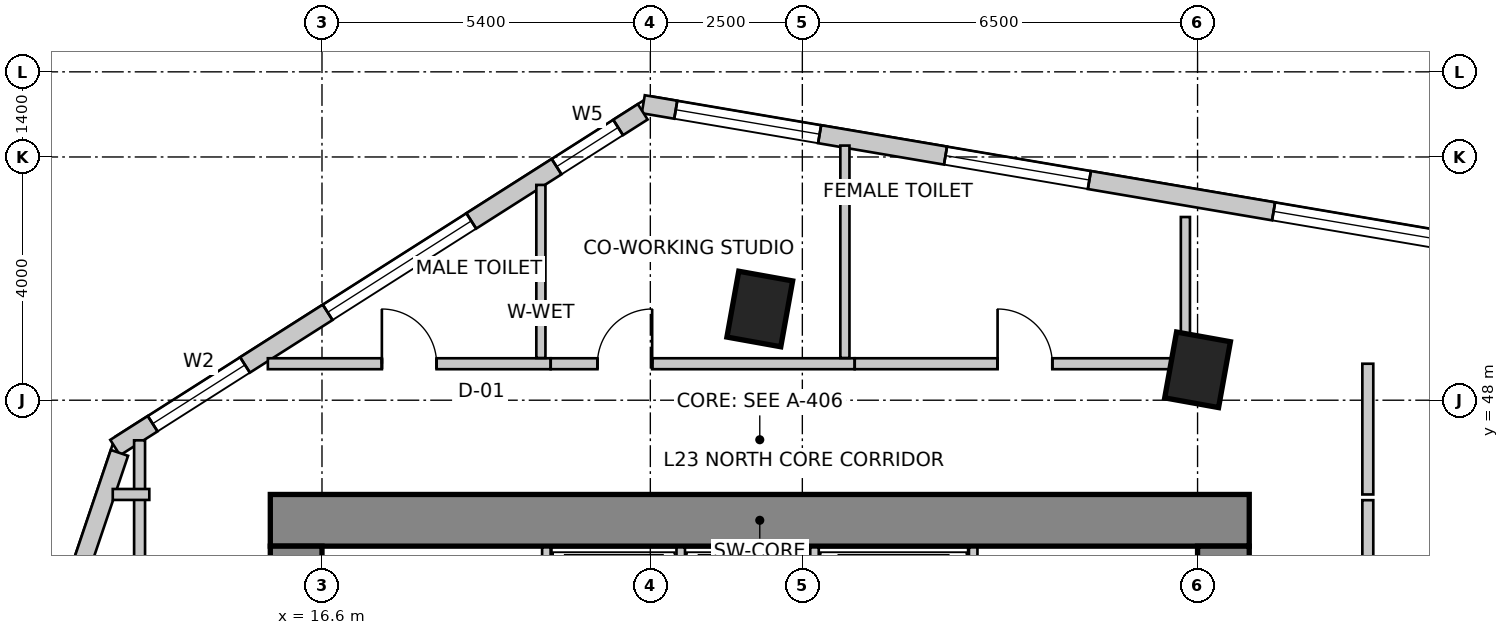
"""IFC4 building model, lengths in metres.
Left out: names, types, materials, properties, quantities, classifications, styles, units other than length and angle.
Written with IfcOpenShell. Run it as: python <this file> out.ifc"""

import sys

from ifc_helpers import new_model, si_unit, direction, frame, frame_2d, origin, origin_2d, place, context, subcontext, project, spatial, rectangle, extrude, source, transform, mapped, element, fill, save


model = new_model("IFC4")
c1 = context("Model", 3, precision=1e-05, world=origin(), true_north=direction((0.0, 1.0)))
c2 = subcontext(c1, "Body", "Model", "MODEL_VIEW")
j1 = project(units=[si_unit("LENGTHUNIT", "METRE"), si_unit("PLANEANGLEUNIT", "RADIAN")], contexts=[c1])
p1 = place(None, origin())
s1 = spatial("IfcSite", under=j1, at=p1, CompositionType="ELEMENT")
p2 = place(p1, origin())
s2 = spatial("IfcBuilding", under=s1, at=p2, CompositionType="ELEMENT")
p3 = place(p2, frame((0.0, 0.0, 95.0)))
s3 = spatial("IfcBuildingStorey", under=s2, at=p3, CompositionType="ELEMENT", Elevation=95.0)
p4 = place(p3, frame((15.75, 46.025, 0.0), z_axis=(0.0, 0.0, 1.0), x_axis=(1.0, 0.0, 0.0)))
e1 = element("IfcWall", 1, at=p4, inside=s3, PredefinedType="SHEAR", context=c2, shape_type="SweptSolid", body=[
    extrude(rectangle(XDim=16.1, YDim=0.85, at=frame_2d((8.05, 0.0))), origin(), (0.0, 0.0, 1.0), 4.0),
])
p5 = place(p3, frame((16.175, 34.2, 0.0), z_axis=(0.0, 0.0, 1.0), x_axis=(0.0, 1.0, 0.0)))
e2 = element("IfcWall", 2, at=p5, inside=s3, PredefinedType="SHEAR", context=c2, shape_type="SweptSolid", body=[
    extrude(rectangle(XDim=11.4, YDim=0.85, at=frame_2d((5.7, 0.0))), origin(), (0.0, 0.0, 1.0), 4.0),
])
m1 = source(origin(), c2, "Body", "SweptSolid", [
    extrude(rectangle(XDim=1.1, YDim=2.15, at=frame_2d((0.55, 1.075))), frame((0.0, 0.435, 0.0), z_axis=(0.0, -1.0, 0.0), x_axis=(1.0, 0.0, 0.0)), (0.0, 0.0, 1.0), 0.87),
])
p6 = place(p5, frame((7.15, 0.0, 0.0)))
e3 = element("IfcOpeningElement", 3, at=p6, cuts=e2, PredefinedType="OPENING", context=c2, shape_type="MappedRepresentation", body=[
    mapped(m1, transform((0.0, 0.0, 0.0), scale=1.0)),
])
p7 = place(p3, frame((31.425, 34.2, 0.0), z_axis=(0.0, 0.0, 1.0), x_axis=(0.0, 1.0, 0.0)))
e4 = element("IfcWall", 4, at=p7, inside=s3, PredefinedType="SHEAR", context=c2, shape_type="SweptSolid", body=[
    extrude(rectangle(XDim=11.4, YDim=0.85, at=frame_2d((5.7, 0.0))), origin(), (0.0, 0.0, 1.0), 4.0),
])
p8 = place(p7, frame((7.35, 0.0, 0.0)))
e5 = element("IfcOpeningElement", 5, at=p8, cuts=e4, PredefinedType="OPENING", context=c2, shape_type="MappedRepresentation", body=[
    mapped(m1, transform((0.0, 0.0, 0.0), scale=1.0)),
])
m2 = source(origin(), c2, "Body", "SweptSolid", [
    extrude(rectangle(XDim=0.9, YDim=1.1, at=origin_2d()), origin(), (0.0, 0.0, 1.0), 4.0),
])
for number, where, z_axis, x_axis in (
    (6, (23.8, 49.5, 0.0), (0.0, 0.0, 1.0), (0.984, -0.177, 0.0)),
    (7, (31.0, 48.5, 0.0), (0.0, 0.0, 1.0), (0.984, -0.177, 0.0)),
):
    element("IfcColumn", number, at=place(p3, frame(where, z_axis=z_axis, x_axis=x_axis)), inside=s3, PredefinedType="COLUMN", context=c2, shape_type="MappedRepresentation", body=[
        mapped(m2, transform((0.0, 0.0, 0.0), scale=1.0)),
    ])
p9 = place(p3, frame((53.961, 47.417, 0.0), z_axis=(0.0, 0.0, 1.0), x_axis=(-0.985865713455, 0.167537443678, 0.0)))
e8 = element("IfcWall", 8, at=p9, inside=s3, PredefinedType="SOLIDWALL", context=c2, shape_type="SweptSolid", body=[
    extrude(rectangle(XDim=32.537, YDim=0.3, at=frame_2d((16.269, 0.0))), origin(), (0.0, 0.0, 1.0), 3.7),
])
m3 = source(origin(), c2, "Body", "SweptSolid", [
    extrude(rectangle(XDim=2.1, YDim=2.0, at=frame_2d((1.05, 1.0))), frame((0.0, 0.16, 0.0), z_axis=(0.0, -1.0, 0.0), x_axis=(1.0, 0.0, 0.0)), (0.0, 0.0, 1.0), 0.32),
])
p10 = place(p9, frame((0.626, 0.0, 0.85)))
e9 = element("IfcOpeningElement", 9, at=p10, cuts=e8, PredefinedType="OPENING", context=c2, shape_type="MappedRepresentation", body=[
    mapped(m3, transform((0.0, 0.0, 0.0), scale=1.0)),
])
m4 = source(origin(), c2, "Body", "SweptSolid", [
    extrude(rectangle(XDim=2.4, YDim=2.2, at=frame_2d((1.2, 1.1))), frame((0.0, 0.16, 0.0), z_axis=(0.0, -1.0, 0.0), x_axis=(1.0, 0.0, 0.0)), (0.0, 0.0, 1.0), 0.32),
])
p11 = place(p9, frame((4.504, 0.0, 0.85)))
e10 = element("IfcOpeningElement", 10, at=p11, cuts=e8, PredefinedType="OPENING", context=c2, shape_type="MappedRepresentation", body=[
    mapped(m4, transform((0.0, 0.0, 0.0), scale=1.0)),
])
m5 = source(origin(), c2, "Body", "SweptSolid", [
    extrude(rectangle(XDim=2.8, YDim=2.4, at=frame_2d((1.4, 1.2))), frame((0.0, 0.16, 0.0), z_axis=(0.0, -1.0, 0.0), x_axis=(1.0, 0.0, 0.0)), (0.0, 0.0, 1.0), 0.32),
])
p12 = place(p9, frame((8.768, 0.0, 0.85)))
e11 = element("IfcOpeningElement", 11, at=p12, cuts=e8, PredefinedType="OPENING", context=c2, shape_type="MappedRepresentation", body=[
    mapped(m5, transform((0.0, 0.0, 0.0), scale=1.0)),
])
p13 = place(p9, frame((14.234, 0.0, 0.85)))
e12 = element("IfcOpeningElement", 12, at=p13, cuts=e8, PredefinedType="OPENING", context=c2, shape_type="MappedRepresentation", body=[
    mapped(m4, transform((0.0, 0.0, 0.0), scale=1.0)),
])
p14 = place(p9, frame((19.222, 0.0, 0.85)))
e13 = element("IfcOpeningElement", 13, at=p14, cuts=e8, PredefinedType="OPENING", context=c2, shape_type="MappedRepresentation", body=[
    mapped(m5, transform((0.0, 0.0, 0.0), scale=1.0)),
])
p15 = place(p9, frame((25.095, 0.0, 0.85)))
e14 = element("IfcOpeningElement", 14, at=p15, cuts=e8, PredefinedType="OPENING", context=c2, shape_type="MappedRepresentation", body=[
    mapped(m4, transform((0.0, 0.0, 0.0), scale=1.0)),
])
p16 = place(p9, frame((29.595, 0.0, 0.85)))
e15 = element("IfcOpeningElement", 15, at=p16, cuts=e8, PredefinedType="OPENING", context=c2, shape_type="MappedRepresentation", body=[
    mapped(m4, transform((0.0, 0.0, 0.0), scale=1.0)),
])
p17 = place(p3, frame((21.875, 52.742, 0.0), z_axis=(0.0, 0.0, 1.0), x_axis=(-0.843662465249, -0.536873956092, 0.0)))
e16 = element("IfcWall", 16, at=p17, inside=s3, PredefinedType="SOLIDWALL", context=c2, shape_type="SweptSolid", body=[
    extrude(rectangle(XDim=10.284, YDim=0.3, at=frame_2d((5.142, 0.0))), origin(), (0.0, 0.0, 1.0), 3.7),
])
m6 = source(origin(), c2, "Body", "SweptSolid", [
    extrude(rectangle(XDim=1.2, YDim=1.6, at=frame_2d((0.6, 0.8))), frame((0.0, 0.16, 0.0), z_axis=(0.0, -1.0, 0.0), x_axis=(1.0, 0.0, 0.0)), (0.0, 0.0, 1.0), 0.32),
])
p18 = place(p17, frame((0.479, 0.0, 0.85)))
e17 = element("IfcOpeningElement", 17, at=p18, cuts=e16, PredefinedType="OPENING", context=c2, shape_type="MappedRepresentation", body=[
    mapped(m6, transform((0.0, 0.0, 0.0), scale=1.0)),
])
p19 = place(p17, frame((3.342, 0.0, 0.85)))
e18 = element("IfcOpeningElement", 18, at=p19, cuts=e16, PredefinedType="OPENING", context=c2, shape_type="MappedRepresentation", body=[
    mapped(m5, transform((0.0, 0.0, 0.0), scale=1.0)),
])
m7 = source(origin(), c2, "Body", "SweptSolid", [
    extrude(rectangle(XDim=1.8, YDim=2.1, at=frame_2d((0.9, 1.05))), frame((0.0, 0.16, 0.0), z_axis=(0.0, -1.0, 0.0), x_axis=(1.0, 0.0, 0.0)), (0.0, 0.0, 1.0), 0.32),
])
p20 = place(p17, frame((7.753, 0.0, 0.85)))
e19 = element("IfcOpeningElement", 19, at=p20, cuts=e16, PredefinedType="OPENING", context=c2, shape_type="MappedRepresentation", body=[
    mapped(m7, transform((0.0, 0.0, 0.0), scale=1.0)),
])
p21 = place(p3, frame((13.269, 47.134, 0.0), z_axis=(0.0, 0.0, 1.0), x_axis=(-0.319920423265, -0.947444416722, 0.0)))
e20 = element("IfcWall", 20, at=p21, inside=s3, PredefinedType="SOLIDWALL", context=c2, shape_type="SweptSolid", body=[
    extrude(rectangle(XDim=16.135, YDim=0.3, at=frame_2d((8.067, 0.0))), origin(), (0.0, 0.0, 1.0), 3.7),
])
p22 = place(p21, frame((2.188, 0.0, 0.85)))
e21 = element("IfcOpeningElement", 21, at=p22, cuts=e20, PredefinedType="OPENING", context=c2, shape_type="MappedRepresentation", body=[
    mapped(m4, transform((0.0, 0.0, 0.0), scale=1.0)),
])
p23 = place(p21, frame((6.959, 0.0, 0.85)))
e22 = element("IfcOpeningElement", 22, at=p23, cuts=e20, PredefinedType="OPENING", context=c2, shape_type="MappedRepresentation", body=[
    mapped(m5, transform((0.0, 0.0, 0.0), scale=1.0)),
])
p24 = place(p21, frame((12.13, 0.0, 0.85)))
e23 = element("IfcOpeningElement", 23, at=p24, cuts=e20, PredefinedType="OPENING", context=c2, shape_type="MappedRepresentation", body=[
    mapped(m4, transform((0.0, 0.0, 0.0), scale=1.0)),
])
for number, where, z_axis, x_axis in (
    (24, (20.29, 43.28, 0.0), (0.0, 0.0, 1.0), (0.0, 1.0, 0.0)),
    (25, (27.31, 43.28, 0.0), (0.0, 0.0, 1.0), (0.0, 1.0, 0.0)),
):
    element("IfcWall", number, at=place(p3, frame(where, z_axis=z_axis, x_axis=x_axis)), inside=s3, PredefinedType="SOLIDWALL", context=c2, shape_type="SweptSolid", body=[
        extrude(rectangle(XDim=2.3, YDim=0.14, at=frame_2d((1.15, 0.0))), origin(), (0.0, 0.0, 1.0), 3.7),
    ])
for number, where, z_axis, x_axis in (
    (26, (22.5, 43.02, 0.0), (0.0, 0.0, 1.0), (0.0, 1.0, 0.0)),
    (27, (24.7, 43.02, 0.0), (0.0, 0.0, 1.0), (0.0, 1.0, 0.0)),
):
    element("IfcWall", number, at=place(p3, frame(where, z_axis=z_axis, x_axis=x_axis)), inside=s3, PredefinedType="SOLIDWALL", context=c2, shape_type="SweptSolid", body=[
        extrude(rectangle(XDim=2.56, YDim=0.14, at=frame_2d((1.28, 0.0))), origin(), (0.0, 0.0, 1.0), 3.7),
    ])
p25 = place(p3, frame((13.6, 33.444, 0.0), z_axis=(0.0, 0.0, 1.0), x_axis=(0.0, 1.0, 0.0)))
e28 = element("IfcWall", 28, at=p25, inside=s3, PredefinedType="PARTITIONING", context=c2, shape_type="SweptSolid", body=[
    extrude(rectangle(XDim=13.896, YDim=0.18, at=frame_2d((6.948, 0.0))), origin(), (0.0, 0.0, 1.0), 2.842),
])
m8 = source(origin(), c2, "Body", "SweptSolid", [
    extrude(rectangle(XDim=0.9, YDim=2.15, at=frame_2d((0.45, 1.075))), frame((0.0, 0.1, 0.0), z_axis=(0.0, -1.0, 0.0), x_axis=(1.0, 0.0, 0.0)), (0.0, 0.0, 1.0), 0.2),
])
p26 = place(p25, frame((4.144, 0.0, 0.0)))
e29 = element("IfcOpeningElement", 29, at=p26, cuts=e28, PredefinedType="OPENING", context=c2, shape_type="MappedRepresentation", body=[
    mapped(m8, transform((0.0, 0.0, 0.0), scale=1.0)),
])
p27 = place(p3, frame((13.76, 46.45, 0.0), z_axis=(0.0, 0.0, 1.0), x_axis=(-1.0, 0.0, 0.0)))
e30 = element("IfcWall", 30, at=p27, inside=s3, PredefinedType="PARTITIONING", context=c2, shape_type="SweptSolid", body=[
    extrude(rectangle(XDim=0.601, YDim=0.18, at=frame_2d((0.301, 0.0))), origin(), (0.0, 0.0, 1.0), 3.7),
])
p28 = place(p3, frame((15.71, 48.6, 0.0), z_axis=(0.0, 0.0, 1.0), x_axis=(1.0, 0.0, 0.0)))
e31 = element("IfcWall", 31, at=p28, inside=s3, PredefinedType="PARTITIONING", context=c2, shape_type="SweptSolid", body=[
    extrude(rectangle(XDim=4.65, YDim=0.18, at=frame_2d((2.325, 0.0))), origin(), (0.0, 0.0, 1.0), 3.7),
])
p29 = place(p28, frame((1.875, 0.0, 0.0)))
e32 = element("IfcOpeningElement", 32, at=p29, cuts=e31, PredefinedType="OPENING", context=c2, shape_type="MappedRepresentation", body=[
    mapped(m8, transform((0.0, 0.0, 0.0), scale=1.0)),
])
p30 = place(p3, frame((20.362, 48.6, 0.0), z_axis=(0.0, 0.0, 1.0), x_axis=(1.0, 0.0, 0.0)))
e33 = element("IfcWall", 33, at=p30, inside=s3, PredefinedType="PARTITIONING", context=c2, shape_type="SweptSolid", body=[
    extrude(rectangle(XDim=4.998, YDim=0.18, at=frame_2d((2.499, 0.0))), origin(), (0.0, 0.0, 1.0), 3.384),
])
p31 = place(p30, frame((0.768, 0.0, 0.0)))
e34 = element("IfcOpeningElement", 34, at=p31, cuts=e33, PredefinedType="OPENING", context=c2, shape_type="MappedRepresentation", body=[
    mapped(m8, transform((0.0, 0.0, 0.0), scale=1.0)),
])
p32 = place(p3, frame((25.362, 48.6, 0.0), z_axis=(0.0, 0.0, 1.0), x_axis=(1.0, 0.0, 0.0)))
e35 = element("IfcWall", 35, at=p32, inside=s3, PredefinedType="PARTITIONING", context=c2, shape_type="SweptSolid", body=[
    extrude(rectangle(XDim=5.598, YDim=0.18, at=frame_2d((2.799, 0.0))), origin(), (0.0, 0.0, 1.0), 2.842),
])
p33 = place(p32, frame((2.349, 0.0, 0.0)))
e36 = element("IfcOpeningElement", 36, at=p33, cuts=e35, PredefinedType="OPENING", context=c2, shape_type="MappedRepresentation", body=[
    mapped(m8, transform((0.0, 0.0, 0.0), scale=1.0)),
])
p34 = place(p3, frame((33.8, 48.6, 0.0), z_axis=(0.0, 0.0, 1.0), x_axis=(0.0, -1.0, 0.0)))
e37 = element("IfcWall", 37, at=p34, inside=s3, PredefinedType="PARTITIONING", context=c2, shape_type="SweptSolid", body=[
    extrude(rectangle(XDim=2.15, YDim=0.18, at=frame_2d((1.075, 0.0))), origin(), (0.0, 0.0, 1.0), 2.842),
])
p35 = place(p3, frame((33.8, 46.356, 0.0), z_axis=(0.0, 0.0, 1.0), x_axis=(0.0, -1.0, 0.0)))
e38 = element("IfcWall", 38, at=p35, inside=s3, PredefinedType="PARTITIONING", context=c2, shape_type="SweptSolid", body=[
    extrude(rectangle(XDim=3.716, YDim=0.18, at=frame_2d((1.858, 0.0))), origin(), (0.0, 0.0, 1.0), 3.272),
])
p36 = place(p3, frame((20.2, 51.54, 0.0), z_axis=(0.0, 0.0, 1.0), x_axis=(0.0, -1.0, 0.0)))
e39 = element("IfcWall", 39, at=p36, inside=s3, PredefinedType="PARTITIONING", context=c2, shape_type="SweptSolid", body=[
    extrude(rectangle(XDim=2.846, YDim=0.15, at=frame_2d((1.423, 0.0))), origin(), (0.0, 0.0, 1.0), 3.7),
])
p37 = place(p3, frame((25.2, 52.188, 0.0), z_axis=(0.0, 0.0, 1.0), x_axis=(0.0, -1.0, 0.0)))
e40 = element("IfcWall", 40, at=p37, inside=s3, PredefinedType="PARTITIONING", context=c2, shape_type="SweptSolid", body=[
    extrude(rectangle(XDim=3.493, YDim=0.15, at=frame_2d((1.747, 0.0))), origin(), (0.0, 0.0, 1.0), 2.842),
])
p38 = place(p3, frame((30.8, 51.013, 0.0), z_axis=(0.0, 0.0, 1.0), x_axis=(0.0, -1.0, 0.0)))
e41 = element("IfcWall", 41, at=p38, inside=s3, PredefinedType="PARTITIONING", context=c2, shape_type="SweptSolid", body=[
    extrude(rectangle(XDim=2.193, YDim=0.15, at=frame_2d((1.096, 0.0))), origin(), (0.0, 0.0, 1.0), 3.7),
])
m9 = source(origin(), c2, "Body", "SweptSolid", [
    extrude(rectangle(XDim=2.8, YDim=2.4, at=frame_2d((1.4, 1.2))), frame((0.0, -0.015, 0.0), z_axis=(0.0, -1.0, 0.0), x_axis=(1.0, 0.0, 0.0)), (0.0, 0.0, 1.0), 0.06),
])
p39 = place(p14, origin())
e42 = element("IfcWindow", 42, at=p39, inside=s3, PartitioningType="SINGLE_PANEL", PredefinedType="WINDOW", context=c2, shape_type="MappedRepresentation", body=[
    mapped(m9, transform((0.0, 0.0, 0.0), scale=1.0)),
])
fill(e13, e42)
m10 = source(origin(), c2, "Body", "SweptSolid", [
    extrude(rectangle(XDim=2.4, YDim=2.2, at=frame_2d((1.2, 1.1))), frame((0.0, -0.015, 0.0), z_axis=(0.0, -1.0, 0.0), x_axis=(1.0, 0.0, 0.0)), (0.0, 0.0, 1.0), 0.06),
])
p40 = place(p15, origin())
e43 = element("IfcWindow", 43, at=p40, inside=s3, PartitioningType="SINGLE_PANEL", PredefinedType="WINDOW", context=c2, shape_type="MappedRepresentation", body=[
    mapped(m10, transform((0.0, 0.0, 0.0), scale=1.0)),
])
fill(e14, e43)
p41 = place(p16, origin())
e44 = element("IfcWindow", 44, at=p41, inside=s3, PartitioningType="SINGLE_PANEL", PredefinedType="WINDOW", context=c2, shape_type="MappedRepresentation", body=[
    mapped(m10, transform((0.0, 0.0, 0.0), scale=1.0)),
])
fill(e15, e44)
m11 = source(origin(), c2, "Body", "SweptSolid", [
    extrude(rectangle(XDim=1.2, YDim=1.6, at=frame_2d((0.6, 0.8))), frame((0.0, -0.015, 0.0), z_axis=(0.0, -1.0, 0.0), x_axis=(1.0, 0.0, 0.0)), (0.0, 0.0, 1.0), 0.06),
])
p42 = place(p18, origin())
e45 = element("IfcWindow", 45, at=p42, inside=s3, PartitioningType="SINGLE_PANEL", PredefinedType="WINDOW", context=c2, shape_type="MappedRepresentation", body=[
    mapped(m11, transform((0.0, 0.0, 0.0), scale=1.0)),
])
fill(e17, e45)
p43 = place(p19, origin())
e46 = element("IfcWindow", 46, at=p43, inside=s3, PartitioningType="SINGLE_PANEL", PredefinedType="WINDOW", context=c2, shape_type="MappedRepresentation", body=[
    mapped(m9, transform((0.0, 0.0, 0.0), scale=1.0)),
])
fill(e18, e46)
m12 = source(origin(), c2, "Body", "SweptSolid", [
    extrude(rectangle(XDim=1.8, YDim=2.1, at=frame_2d((0.9, 1.05))), frame((0.0, -0.015, 0.0), z_axis=(0.0, -1.0, 0.0), x_axis=(1.0, 0.0, 0.0)), (0.0, 0.0, 1.0), 0.06),
])
p44 = place(p20, origin())
e47 = element("IfcWindow", 47, at=p44, inside=s3, PartitioningType="SINGLE_PANEL", PredefinedType="WINDOW", context=c2, shape_type="MappedRepresentation", body=[
    mapped(m12, transform((0.0, 0.0, 0.0), scale=1.0)),
])
fill(e19, e47)
m13 = source(origin(), c2, "Body", "SweptSolid", [
    extrude(rectangle(XDim=0.9, YDim=2.15, at=frame_2d((0.45, 1.075))), frame((0.0, 0.025, 0.0), z_axis=(0.0, -1.0, 0.0), x_axis=(1.0, 0.0, 0.0)), (0.0, 0.0, 1.0), 0.05),
])
p45 = place(p29, origin())
e48 = element("IfcDoor", 48, at=p45, inside=s3, OperationType="SINGLE_SWING_LEFT", PredefinedType="DOOR", context=c2, shape_type="MappedRepresentation", body=[
    mapped(m13, transform((0.0, 0.0, 0.0), scale=1.0)),
])
fill(e32, e48)
p46 = place(p31, origin())
e49 = element("IfcDoor", 49, at=p46, inside=s3, OperationType="SINGLE_SWING_RIGHT", PredefinedType="DOOR", context=c2, shape_type="MappedRepresentation", body=[
    mapped(m13, transform((0.0, 0.0, 0.0), scale=1.0)),
])
fill(e34, e49)
p47 = place(p33, origin())
e50 = element("IfcDoor", 50, at=p47, inside=s3, OperationType="SINGLE_SWING_LEFT", PredefinedType="DOOR", context=c2, shape_type="MappedRepresentation", body=[
    mapped(m13, transform((0.0, 0.0, 0.0), scale=1.0)),
])
fill(e36, e50)
save(model, sys.argv[1])
